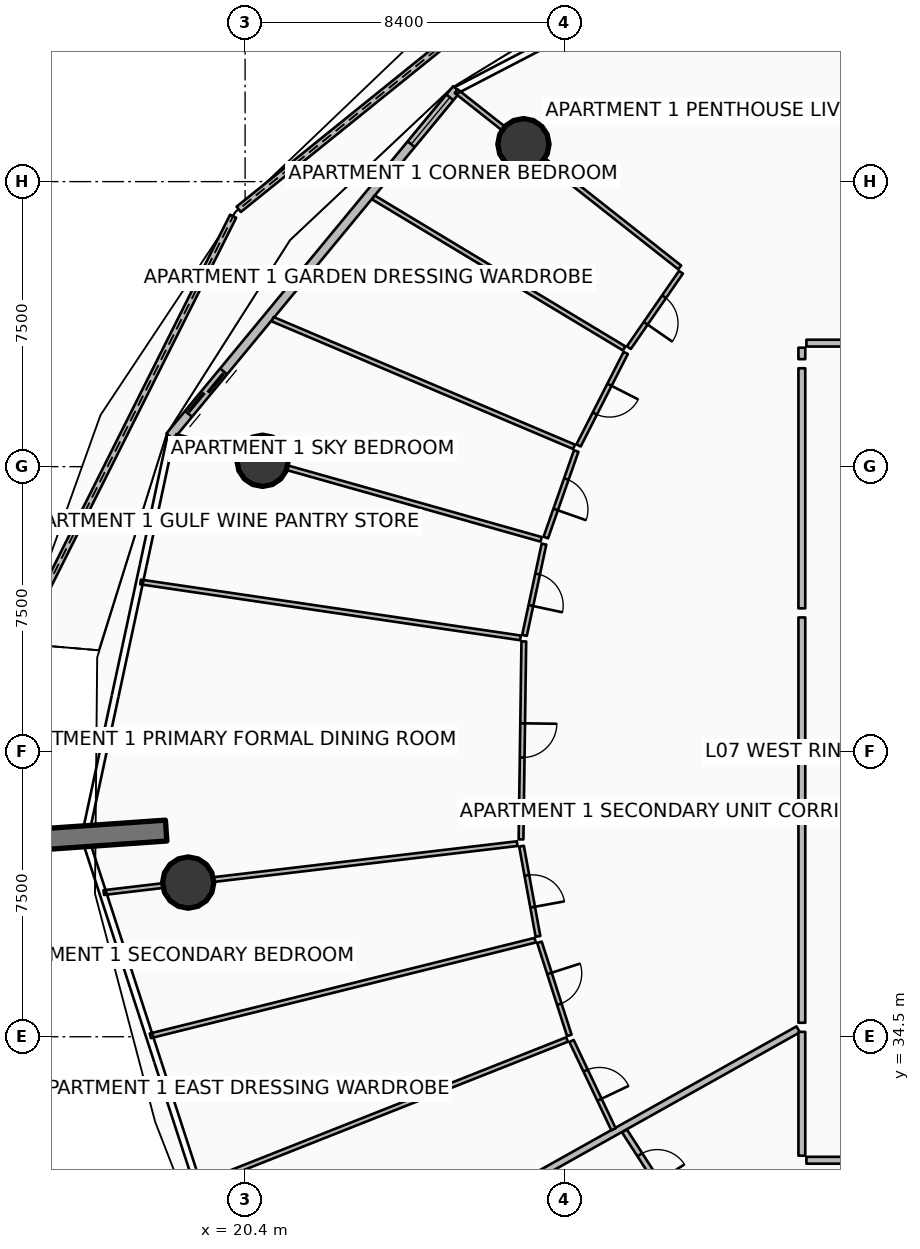
"""IFC4 building model, lengths in metres.
Left out: names, types, materials, properties, quantities, classifications, styles, units other than length and angle.
Written with IfcOpenShell. Run it as: python <this file> out.ifc"""

import sys

from ifc_helpers import new_model, si_unit, direction, frame, frame_2d, origin, origin_2d, place, context, subcontext, project, spatial, polyline, rectangle, circle, outline, extrude, element, fill, save


model = new_model("IFC4")
c1 = context("Model", 3, precision=1e-05, world=origin(), true_north=direction((0.0, 1.0)))
c2 = subcontext(c1, "Body", "Model", "MODEL_VIEW")
j1 = project(units=[si_unit("LENGTHUNIT", "METRE"), si_unit("PLANEANGLEUNIT", "RADIAN")], contexts=[c1])
p1 = place(None, origin())
s1 = spatial("IfcSite", under=j1, at=p1, CompositionType="ELEMENT")
p2 = place(p1, origin())
s2 = spatial("IfcBuilding", under=s1, at=p2, CompositionType="ELEMENT")
p3 = place(p2, frame((0.0, 0.0, 33.9)))
s3 = spatial("IfcBuildingStorey", under=s2, at=p3, CompositionType="ELEMENT", Elevation=33.9)
p4 = place(p3, frame((18.322, 39.925, 0.0), z_axis=(0.0, 0.0, 1.0), x_axis=(-0.997564163539, -0.069754853754, 0.0)))
e1 = element("IfcWall", 1, at=p4, inside=s3, PredefinedType="SOLIDWALL", context=c2, shape_type="SweptSolid", body=[
    extrude(rectangle(XDim=3.5, YDim=0.55, at=frame_2d((1.75, 0.0))), origin(), (0.0, 0.0, 1.0), 3.75),
])
for number, where, z_axis, x_axis in (
    (2, (27.724, 57.984, 0.0), (0.0, 0.0, 1.0), (1.0, 0.0, 0.0)),
    (3, (20.859, 49.655, 0.0), (0.0, 0.0, 1.0), (1.0, 0.0, 0.0)),
    (4, (18.902, 38.556, 0.0), (0.0, 0.0, 1.0), (1.0, 0.0, 0.0)),
):
    element("IfcColumn", number, at=place(p3, frame(where, z_axis=z_axis, x_axis=x_axis)), inside=s3, PredefinedType="COLUMN", context=c2, shape_type="SweptSolid", body=[
        extrude(circle(Radius=0.675, at=origin_2d()), origin(), (0.0, 0.0, 1.0), 3.5),
    ])
p5 = place(p3, frame((29.318, 63.605, 0.0), z_axis=(0.0, 0.0, 1.0), x_axis=(-0.778164801363, -0.628060141961, 0.0)))
e5 = element("IfcWall", 5, at=p5, inside=s3, PredefinedType="PARAPET", context=c2, shape_type="SweptSolid", body=[
    extrude(outline(polyline([(0.0, 0.0), (11.677, 0.0), (11.677, 1.148), (5.838, 1.127), (0.0, 1.224), (0.0, 0.0)])), frame((0.0, 0.09, 0.0), z_axis=(0.0, -1.0, 0.0), x_axis=(1.0, 0.0, 0.0)), (0.0, 0.0, 1.0), 0.18),
])
p6 = place(p3, frame((20.085, 56.089, 0.0), z_axis=(0.0, 0.0, 1.0), x_axis=(-0.448439969312, -0.893812952425, 0.0)))
e6 = element("IfcWall", 6, at=p6, inside=s3, PredefinedType="PARAPET", context=c2, shape_type="SweptSolid", body=[
    extrude(outline(polyline([(0.0, 0.0), (12.577, 0.0), (12.577, 1.483), (6.289, 1.284), (0.0, 1.148), (0.0, 0.0)])), frame((0.0, 0.09, 0.0), z_axis=(0.0, -1.0, 0.0), x_axis=(1.0, 0.0, 0.0)), (0.0, 0.0, 1.0), 0.18),
])
p7 = place(p3, frame((25.967, 59.433, 0.0), z_axis=(0.0, 0.0, 1.0), x_axis=(-0.636674332663, -0.771132799281, 0.0)))
e7 = element("IfcWall", 7, at=p7, inside=s3, PredefinedType="SOLIDWALL", context=c2, shape_type="SweptSolid", body=[
    extrude(rectangle(XDim=11.851, YDim=0.24, at=frame_2d((5.926, 0.0))), origin(), (0.0, 0.0, 1.0), 2.45),
])
p8 = place(p7, frame((9.631, 0.0, 0.0)))
e8 = element("IfcOpeningElement", 8, at=p8, cuts=e7, PredefinedType="OPENING", context=c2, shape_type="SweptSolid", body=[
    extrude(rectangle(XDim=1.45, YDim=2.15, at=frame_2d((0.725, 1.075))), frame((0.0, 0.13, 0.0), z_axis=(0.0, -1.0, 0.0), x_axis=(1.0, 0.0, 0.0)), (0.0, 0.0, 1.0), 0.26),
])
p9 = place(p7, frame((0.28, 0.0, 0.65)))
e9 = element("IfcOpeningElement", 9, at=p9, cuts=e7, PredefinedType="OPENING", context=c2, shape_type="SweptSolid", body=[
    extrude(rectangle(XDim=1.6, YDim=1.5, at=frame_2d((0.8, 0.75))), frame((0.0, 0.13, 0.0), z_axis=(0.0, -1.0, 0.0), x_axis=(1.0, 0.0, 0.0)), (0.0, 0.0, 1.0), 0.26),
])
p10 = place(p3, frame((34.954, 34.694, 0.0), z_axis=(0.0, 0.0, 1.0), x_axis=(-0.872493465611, -0.488625779577, 0.0)))
e10 = element("IfcWall", 10, at=p10, inside=s3, PredefinedType="PARTITIONING", context=c2, shape_type="SweptSolid", body=[
    extrude(rectangle(XDim=16.586, YDim=0.18, at=frame_2d((8.293, 0.0))), origin(), (0.0, 0.0, 1.0), 2.867),
])
p11 = place(p3, frame((41.86, 52.75, 0.0), z_axis=(0.0, 0.0, 1.0), x_axis=(-1.0, 0.0, 0.0)))
e11 = element("IfcWall", 11, at=p11, inside=s3, PredefinedType="PARTITIONING", context=c2, shape_type="SweptSolid", body=[
    extrude(rectangle(XDim=6.69, YDim=0.18, at=frame_2d((3.345, 0.0))), origin(), (0.0, 0.0, 1.0), 2.867),
])
p12 = place(p11, frame((2.795, 0.0, 0.0)))
e12 = element("IfcOpeningElement", 12, at=p12, cuts=e11, PredefinedType="OPENING", context=c2, shape_type="SweptSolid", body=[
    extrude(rectangle(XDim=1.1, YDim=2.1, at=frame_2d((0.55, 1.05))), frame((0.0, 0.1, 0.0), z_axis=(0.0, -1.0, 0.0), x_axis=(1.0, 0.0, 0.0)), (0.0, 0.0, 1.0), 0.2),
])
p13 = place(p3, frame((35.05, 52.63, 0.0), z_axis=(0.0, 0.0, 1.0), x_axis=(0.0, -1.0, 0.0)))
e13 = element("IfcWall", 13, at=p13, inside=s3, PredefinedType="PARTITIONING", context=c2, shape_type="SweptSolid", body=[
    extrude(rectangle(XDim=0.301, YDim=0.18, at=frame_2d((0.15, 0.0))), origin(), (0.0, 0.0, 1.0), 2.867),
])
p14 = place(p3, frame((37.943, 59.958, 0.0), z_axis=(0.0, 0.0, 1.0), x_axis=(-0.488606395453, 0.872504321091, 0.0)))
e14 = element("IfcWall", 14, at=p14, inside=s3, PredefinedType="PARTITIONING", context=c2, shape_type="SweptSolid", body=[
    extrude(rectangle(XDim=4.913, YDim=0.125, at=frame_2d((2.457, 0.0))), origin(), (0.0, 0.0, 1.0), 2.867),
])
p15 = place(p3, frame((35.05, 52.089, 0.0), z_axis=(0.0, 0.0, 1.0), x_axis=(0.0, -1.0, 0.0)))
e15 = element("IfcWall", 15, at=p15, inside=s3, PredefinedType="PARTITIONING", context=c2, shape_type="SweptSolid", body=[
    extrude(rectangle(XDim=6.317, YDim=0.18, at=frame_2d((3.158, 0.0))), origin(), (0.0, 0.0, 1.0), 2.867),
])
p16 = place(p3, frame((31.836, 54.743, 0.0), z_axis=(0.0, 0.0, 1.0), x_axis=(-0.785333171854, 0.619073347178, 0.0)))
e16 = element("IfcWall", 16, at=p16, inside=s3, PredefinedType="PARTITIONING", context=c2, shape_type="SweptSolid", body=[
    extrude(rectangle(XDim=7.489, YDim=0.125, at=frame_2d((3.745, 0.0))), origin(), (0.0, 0.0, 1.0), 2.867),
])
p17 = place(p3, frame((30.375, 52.611, 0.0), z_axis=(0.0, 0.0, 1.0), x_axis=(-0.856697740307, 0.515818748936, 0.0)))
e17 = element("IfcWall", 17, at=p17, inside=s3, PredefinedType="PARTITIONING", context=c2, shape_type="SweptSolid", body=[
    extrude(rectangle(XDim=7.704, YDim=0.125, at=frame_2d((3.852, 0.0))), origin(), (0.0, 0.0, 1.0), 2.94),
])
p18 = place(p3, frame((29.055, 50.022, 0.0), z_axis=(0.0, 0.0, 1.0), x_axis=(-0.920841617163, 0.389936810395, 0.0)))
e18 = element("IfcWall", 18, at=p18, inside=s3, PredefinedType="PARTITIONING", context=c2, shape_type="SweptSolid", body=[
    extrude(rectangle(XDim=8.613, YDim=0.125, at=frame_2d((4.306, 0.0))), origin(), (0.0, 0.0, 1.0), 2.94),
])
p19 = place(p3, frame((31.869, 54.615, 0.0), z_axis=(0.0, 0.0, 1.0), x_axis=(-0.568588801709, -0.822621890404, 0.0)))
e19 = element("IfcWall", 19, at=p19, inside=s3, PredefinedType="PARTITIONING", context=c2, shape_type="SweptSolid", body=[
    extrude(rectangle(XDim=2.412, YDim=0.125, at=frame_2d((1.206, 0.0))), origin(), (0.0, 0.0, 1.0), 2.867),
])
p20 = place(p19, frame((0.781, 0.0, 0.0)))
e20 = element("IfcOpeningElement", 20, at=p20, cuts=e19, PredefinedType="OPENING", context=c2, shape_type="SweptSolid", body=[
    extrude(rectangle(XDim=0.85, YDim=2.06, at=frame_2d((0.425, 1.03))), frame((0.0, 0.073, 0.0), z_axis=(0.0, -1.0, 0.0), x_axis=(1.0, 0.0, 0.0)), (0.0, 0.0, 1.0), 0.145),
])
p21 = place(p3, frame((30.416, 52.493, 0.0), z_axis=(0.0, 0.0, 1.0), x_axis=(-0.454024795493, -0.890989048798, 0.0)))
e21 = element("IfcWall", 21, at=p21, inside=s3, PredefinedType="PARTITIONING", context=c2, shape_type="SweptSolid", body=[
    extrude(rectangle(XDim=2.733, YDim=0.125, at=frame_2d((1.367, 0.0))), origin(), (0.0, 0.0, 1.0), 2.94),
])
p22 = place(p21, frame((0.942, 0.0, 0.0)))
e22 = element("IfcOpeningElement", 22, at=p22, cuts=e21, PredefinedType="OPENING", context=c2, shape_type="SweptSolid", body=[
    extrude(rectangle(XDim=0.85, YDim=2.06, at=frame_2d((0.425, 1.03))), frame((0.0, 0.073, 0.0), z_axis=(0.0, -1.0, 0.0), x_axis=(1.0, 0.0, 0.0)), (0.0, 0.0, 1.0), 0.145),
])
p23 = place(p3, frame((29.112, 49.911, 0.0), z_axis=(0.0, 0.0, 1.0), x_axis=(-0.331369117911, -0.943501196446, 0.0)))
e23 = element("IfcWall", 23, at=p23, inside=s3, PredefinedType="PARTITIONING", context=c2, shape_type="SweptSolid", body=[
    extrude(rectangle(XDim=2.412, YDim=0.125, at=frame_2d((1.206, 0.0))), origin(), (0.0, 0.0, 1.0), 2.867),
])
p24 = place(p23, frame((0.781, 0.0, 0.0)))
e24 = element("IfcOpeningElement", 24, at=p24, cuts=e23, PredefinedType="OPENING", context=c2, shape_type="SweptSolid", body=[
    extrude(rectangle(XDim=0.85, YDim=2.06, at=frame_2d((0.425, 1.03))), frame((0.0, 0.073, 0.0), z_axis=(0.0, -1.0, 0.0), x_axis=(1.0, 0.0, 0.0)), (0.0, 0.0, 1.0), 0.145),
])
p25 = place(p3, frame((35.05, 45.532, 0.0), z_axis=(0.0, 0.0, 1.0), x_axis=(0.0, -1.0, 0.0)))
e25 = element("IfcWall", 25, at=p25, inside=s3, PredefinedType="PARTITIONING", context=c2, shape_type="SweptSolid", body=[
    extrude(rectangle(XDim=4.945, YDim=0.18, at=frame_2d((2.472, 0.0))), origin(), (0.0, 0.0, 1.0), 2.867),
])
p26 = place(p3, frame((28.19, 47.587, 0.0), z_axis=(0.0, 0.0, 1.0), x_axis=(-0.962452458747, 0.271450298675, 0.0)))
e26 = element("IfcWall", 26, at=p26, inside=s3, PredefinedType="PARTITIONING", context=c2, shape_type="SweptSolid", body=[
    extrude(rectangle(XDim=9.991, YDim=0.125, at=frame_2d((4.996, 0.0))), origin(), (0.0, 0.0, 1.0), 2.867),
])
p27 = place(p3, frame((27.646, 44.995, 0.0), z_axis=(0.0, 0.0, 1.0), x_axis=(-0.989346856364, 0.145577463234, 0.0)))
e27 = element("IfcWall", 27, at=p27, inside=s3, PredefinedType="PARTITIONING", context=c2, shape_type="SweptSolid", body=[
    extrude(rectangle(XDim=10.104, YDim=0.125, at=frame_2d((5.052, 0.0))), origin(), (0.0, 0.0, 1.0), 2.94),
])
p28 = place(p3, frame((28.265, 47.462, 0.0), z_axis=(0.0, 0.0, 1.0), x_axis=(-0.20890462523, -0.977936019153, 0.0)))
e28 = element("IfcWall", 28, at=p28, inside=s3, PredefinedType="PARTITIONING", context=c2, shape_type="SweptSolid", body=[
    extrude(rectangle(XDim=2.457, YDim=0.125, at=frame_2d((1.228, 0.0))), origin(), (0.0, 0.0, 1.0), 2.867),
])
p29 = place(p28, frame((0.803, 0.0, 0.0)))
e29 = element("IfcOpeningElement", 29, at=p29, cuts=e28, PredefinedType="OPENING", context=c2, shape_type="SweptSolid", body=[
    extrude(rectangle(XDim=0.85, YDim=2.06, at=frame_2d((0.425, 1.03))), frame((0.0, 0.073, 0.0), z_axis=(0.0, -1.0, 0.0), x_axis=(1.0, 0.0, 0.0)), (0.0, 0.0, 1.0), 0.145),
])
p30 = place(p3, frame((27.734, 44.902, 0.0), z_axis=(0.0, 0.0, 1.0), x_axis=(-0.014152399805, -0.999899849775, 0.0)))
e30 = element("IfcWall", 30, at=p30, inside=s3, PredefinedType="PARTITIONING", context=c2, shape_type="SweptSolid", body=[
    extrude(rectangle(XDim=5.21, YDim=0.125, at=frame_2d((2.605, 0.0))), origin(), (0.0, 0.0, 1.0), 2.867),
])
p31 = place(p30, frame((2.155, 0.0, 0.0)))
e31 = element("IfcOpeningElement", 31, at=p31, cuts=e30, PredefinedType="OPENING", context=c2, shape_type="SweptSolid", body=[
    extrude(rectangle(XDim=0.9, YDim=2.08, at=frame_2d((0.45, 1.04))), frame((0.0, 0.073, 0.0), z_axis=(0.0, -1.0, 0.0), x_axis=(1.0, 0.0, 0.0)), (0.0, 0.0, 1.0), 0.145),
])
p32 = place(p3, frame((35.05, 40.347, 0.0), z_axis=(0.0, 0.0, 1.0), x_axis=(0.0, -1.0, 0.0)))
e32 = element("IfcWall", 32, at=p32, inside=s3, PredefinedType="PARTITIONING", context=c2, shape_type="SweptSolid", body=[
    extrude(rectangle(XDim=5.48, YDim=0.18, at=frame_2d((2.74, 0.0))), origin(), (0.0, 0.0, 1.0), 2.867),
])
p33 = place(p3, frame((27.56, 39.581, 0.0), z_axis=(0.0, 0.0, 1.0), x_axis=(-0.993067148518, -0.117548451854, 0.0)))
e33 = element("IfcWall", 33, at=p33, inside=s3, PredefinedType="PARTITIONING", context=c2, shape_type="SweptSolid", body=[
    extrude(rectangle(XDim=10.956, YDim=0.125, at=frame_2d((5.478, 0.0))), origin(), (0.0, 0.0, 1.0), 2.867),
])
p34 = place(p3, frame((28.034, 37.04, 0.0), z_axis=(0.0, 0.0, 1.0), x_axis=(-0.970510155377, -0.241060237928, 0.0)))
e34 = element("IfcWall", 34, at=p34, inside=s3, PredefinedType="PARTITIONING", context=c2, shape_type="SweptSolid", body=[
    extrude(rectangle(XDim=10.437, YDim=0.125, at=frame_2d((5.218, 0.0))), origin(), (0.0, 0.0, 1.0), 2.94),
])
p35 = place(p3, frame((28.872, 34.427, 0.0), z_axis=(0.0, 0.0, 1.0), x_axis=(-0.929776542834, -0.368124408855, 0.0)))
e35 = element("IfcWall", 35, at=p35, inside=s3, PredefinedType="PARTITIONING", context=c2, shape_type="SweptSolid", body=[
    extrude(rectangle(XDim=10.42, YDim=0.125, at=frame_2d((5.21, 0.0))), origin(), (0.0, 0.0, 1.0), 2.94),
])
p36 = place(p3, frame((27.673, 39.514, 0.0), z_axis=(0.0, 0.0, 1.0), x_axis=(0.179642413558, -0.983731977345, 0.0)))
e36 = element("IfcWall", 36, at=p36, inside=s3, PredefinedType="PARTITIONING", context=c2, shape_type="SweptSolid", body=[
    extrude(rectangle(XDim=2.412, YDim=0.125, at=frame_2d((1.206, 0.0))), origin(), (0.0, 0.0, 1.0), 2.867),
])
p37 = place(p36, frame((0.781, 0.0, 0.0)))
e37 = element("IfcOpeningElement", 37, at=p37, cuts=e36, PredefinedType="OPENING", context=c2, shape_type="SweptSolid", body=[
    extrude(rectangle(XDim=0.85, YDim=2.06, at=frame_2d((0.425, 1.03))), frame((0.0, 0.073, 0.0), z_axis=(0.0, -1.0, 0.0), x_axis=(1.0, 0.0, 0.0)), (0.0, 0.0, 1.0), 0.145),
])
p38 = place(p3, frame((28.146, 36.986, 0.0), z_axis=(0.0, 0.0, 1.0), x_axis=(0.305274947668, -0.952264252362, 0.0)))
e38 = element("IfcWall", 38, at=p38, inside=s3, PredefinedType="PARTITIONING", context=c2, shape_type="SweptSolid", body=[
    extrude(rectangle(XDim=2.573, YDim=0.125, at=frame_2d((1.286, 0.0))), origin(), (0.0, 0.0, 1.0), 2.94),
])
p39 = place(p38, frame((0.861, 0.0, 0.0)))
e39 = element("IfcOpeningElement", 39, at=p39, cuts=e38, PredefinedType="OPENING", context=c2, shape_type="SweptSolid", body=[
    extrude(rectangle(XDim=0.85, YDim=2.06, at=frame_2d((0.425, 1.03))), frame((0.0, 0.073, 0.0), z_axis=(0.0, -1.0, 0.0), x_axis=(1.0, 0.0, 0.0)), (0.0, 0.0, 1.0), 0.145),
])
p40 = place(p3, frame((28.99, 34.387, 0.0), z_axis=(0.0, 0.0, 1.0), x_axis=(0.429399392499, -0.903114700202, 0.0)))
e40 = element("IfcWall", 40, at=p40, inside=s3, PredefinedType="PARTITIONING", context=c2, shape_type="SweptSolid", body=[
    extrude(rectangle(XDim=2.573, YDim=0.125, at=frame_2d((1.286, 0.0))), origin(), (0.0, 0.0, 1.0), 2.867),
])
p41 = place(p40, frame((0.861, 0.0, 0.0)))
e41 = element("IfcOpeningElement", 41, at=p41, cuts=e40, PredefinedType="OPENING", context=c2, shape_type="SweptSolid", body=[
    extrude(rectangle(XDim=0.85, YDim=2.06, at=frame_2d((0.425, 1.03))), frame((0.0, 0.073, 0.0), z_axis=(0.0, -1.0, 0.0), x_axis=(1.0, 0.0, 0.0)), (0.0, 0.0, 1.0), 0.145),
])
p42 = place(p3, frame((35.05, 34.628, 0.0), z_axis=(0.0, 0.0, 1.0), x_axis=(0.0, -1.0, 0.0)))
e42 = element("IfcWall", 42, at=p42, inside=s3, PredefinedType="PARTITIONING", context=c2, shape_type="SweptSolid", body=[
    extrude(rectangle(XDim=3.258, YDim=0.18, at=frame_2d((1.629, 0.0))), origin(), (0.0, 0.0, 1.0), 2.867),
])
p43 = place(p3, frame((35.17, 31.25, 0.0), z_axis=(0.0, 0.0, 1.0), x_axis=(1.0, 0.0, 0.0)))
e43 = element("IfcWall", 43, at=p43, inside=s3, PredefinedType="PARTITIONING", context=c2, shape_type="SweptSolid", body=[
    extrude(rectangle(XDim=4.236, YDim=0.18, at=frame_2d((2.118, 0.0))), origin(), (0.0, 0.0, 1.0), 2.867),
])
p44 = place(p3, frame((30.384, 32.02, 0.0), z_axis=(0.0, 0.0, 1.0), x_axis=(0.542055500246, -0.84034268882, 0.0)))
e44 = element("IfcWall", 44, at=p44, inside=s3, PredefinedType="PARTITIONING", context=c2, shape_type="SweptSolid", body=[
    extrude(rectangle(XDim=2.338, YDim=0.15, at=frame_2d((1.169, 0.0))), origin(), (0.0, 0.0, 1.0), 2.867),
])
p45 = place(p44, frame((0.744, 0.0, 0.0)))
e45 = element("IfcOpeningElement", 45, at=p45, cuts=e44, PredefinedType="OPENING", context=c2, shape_type="SweptSolid", body=[
    extrude(rectangle(XDim=0.85, YDim=2.06, at=frame_2d((0.425, 1.03))), frame((0.0, 0.085, 0.0), z_axis=(0.0, -1.0, 0.0), x_axis=(1.0, 0.0, 0.0)), (0.0, 0.0, 1.0), 0.17),
])
p46 = place(p8, origin())
e46 = element("IfcDoor", 46, at=p46, inside=s3, OperationType="DOUBLE_DOOR_SLIDING", PredefinedType="DOOR", context=c2, shape_type="SweptSolid", body=[
    extrude(rectangle(XDim=1.45, YDim=2.15, at=frame_2d((0.725, 1.075))), frame((0.0, 0.025, 0.0), z_axis=(0.0, -1.0, 0.0), x_axis=(1.0, 0.0, 0.0)), (0.0, 0.0, 1.0), 0.05),
])
fill(e8, e46)
p47 = place(p9, origin())
e47 = element("IfcWindow", 47, at=p47, inside=s3, PartitioningType="SINGLE_PANEL", PredefinedType="WINDOW", context=c2, shape_type="SweptSolid", body=[
    extrude(rectangle(XDim=1.6, YDim=1.5, at=frame_2d((0.8, 0.75))), frame((0.0, 0.03, 0.0), z_axis=(0.0, -1.0, 0.0), x_axis=(1.0, 0.0, 0.0)), (0.0, 0.0, 1.0), 0.06),
])
fill(e9, e47)
p48 = place(p20, origin())
e48 = element("IfcDoor", 48, at=p48, inside=s3, OperationType="SINGLE_SWING_RIGHT", PredefinedType="DOOR", context=c2, shape_type="SweptSolid", body=[
    extrude(rectangle(XDim=0.85, YDim=2.06, at=frame_2d((0.425, 1.03))), frame((0.0, 0.025, 0.0), z_axis=(0.0, -1.0, 0.0), x_axis=(1.0, 0.0, 0.0)), (0.0, 0.0, 1.0), 0.05),
])
fill(e20, e48)
p49 = place(p22, origin())
e49 = element("IfcDoor", 49, at=p49, inside=s3, OperationType="SINGLE_SWING_LEFT", PredefinedType="DOOR", context=c2, shape_type="SweptSolid", body=[
    extrude(rectangle(XDim=0.85, YDim=2.06, at=frame_2d((0.425, 1.03))), frame((0.0, 0.025, 0.0), z_axis=(0.0, -1.0, 0.0), x_axis=(1.0, 0.0, 0.0)), (0.0, 0.0, 1.0), 0.05),
])
fill(e22, e49)
p50 = place(p24, origin())
e50 = element("IfcDoor", 50, at=p50, inside=s3, OperationType="SINGLE_SWING_RIGHT", PredefinedType="DOOR", context=c2, shape_type="SweptSolid", body=[
    extrude(rectangle(XDim=0.85, YDim=2.06, at=frame_2d((0.425, 1.03))), frame((0.0, 0.025, 0.0), z_axis=(0.0, -1.0, 0.0), x_axis=(1.0, 0.0, 0.0)), (0.0, 0.0, 1.0), 0.05),
])
fill(e24, e50)
p51 = place(p29, origin())
e51 = element("IfcDoor", 51, at=p51, inside=s3, OperationType="SINGLE_SWING_RIGHT", PredefinedType="DOOR", context=c2, shape_type="SweptSolid", body=[
    extrude(rectangle(XDim=0.85, YDim=2.06, at=frame_2d((0.425, 1.03))), frame((0.0, 0.025, 0.0), z_axis=(0.0, -1.0, 0.0), x_axis=(1.0, 0.0, 0.0)), (0.0, 0.0, 1.0), 0.05),
])
fill(e29, e51)
p52 = place(p31, origin())
e52 = element("IfcDoor", 52, at=p52, inside=s3, OperationType="SINGLE_SWING_LEFT", PredefinedType="DOOR", context=c2, shape_type="SweptSolid", body=[
    extrude(rectangle(XDim=0.9, YDim=2.08, at=frame_2d((0.45, 1.04))), frame((0.0, 0.025, 0.0), z_axis=(0.0, -1.0, 0.0), x_axis=(1.0, 0.0, 0.0)), (0.0, 0.0, 1.0), 0.05),
])
fill(e31, e52)
p53 = place(p37, origin())
e53 = element("IfcDoor", 53, at=p53, inside=s3, OperationType="SINGLE_SWING_RIGHT", PredefinedType="DOOR", context=c2, shape_type="SweptSolid", body=[
    extrude(rectangle(XDim=0.85, YDim=2.06, at=frame_2d((0.425, 1.03))), frame((0.0, 0.025, 0.0), z_axis=(0.0, -1.0, 0.0), x_axis=(1.0, 0.0, 0.0)), (0.0, 0.0, 1.0), 0.05),
])
fill(e37, e53)
p54 = place(p39, origin())
e54 = element("IfcDoor", 54, at=p54, inside=s3, OperationType="SINGLE_SWING_LEFT", PredefinedType="DOOR", context=c2, shape_type="SweptSolid", body=[
    extrude(rectangle(XDim=0.85, YDim=2.06, at=frame_2d((0.425, 1.03))), frame((0.0, 0.025, 0.0), z_axis=(0.0, -1.0, 0.0), x_axis=(1.0, 0.0, 0.0)), (0.0, 0.0, 1.0), 0.05),
])
fill(e39, e54)
p55 = place(p41, origin())
e55 = element("IfcDoor", 55, at=p55, inside=s3, OperationType="SINGLE_SWING_RIGHT", PredefinedType="DOOR", context=c2, shape_type="SweptSolid", body=[
    extrude(rectangle(XDim=0.85, YDim=2.06, at=frame_2d((0.425, 1.03))), frame((0.0, 0.025, 0.0), z_axis=(0.0, -1.0, 0.0), x_axis=(1.0, 0.0, 0.0)), (0.0, 0.0, 1.0), 0.05),
])
fill(e41, e55)
p56 = place(p45, origin())
e56 = element("IfcDoor", 56, at=p56, inside=s3, OperationType="SINGLE_SWING_RIGHT", PredefinedType="DOOR", context=c2, shape_type="SweptSolid", body=[
    extrude(rectangle(XDim=0.85, YDim=2.06, at=frame_2d((0.425, 1.03))), frame((0.0, 0.025, 0.0), z_axis=(0.0, -1.0, 0.0), x_axis=(1.0, 0.0, 0.0)), (0.0, 0.0, 1.0), 0.05),
])
fill(e45, e56)
save(model, sys.argv[1])
